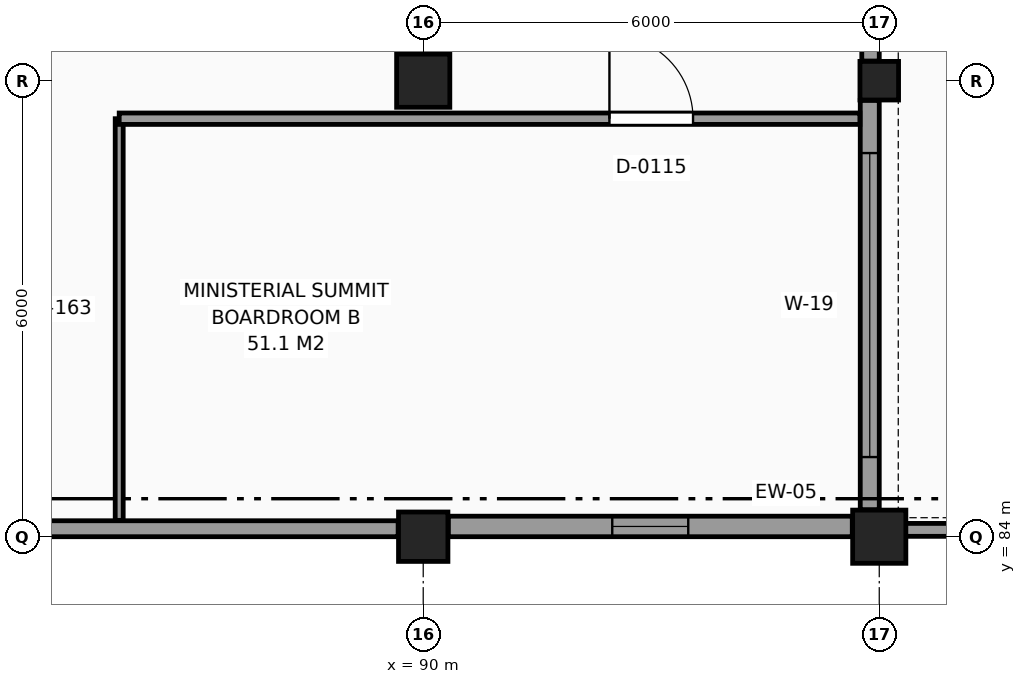
"""IFC4 building model, lengths in metres.
Left out: names, types, materials, properties, quantities, classifications, styles, units other than length and angle.
Written with IfcOpenShell. Run it as: python <this file> out.ifc"""

import sys

from ifc_helpers import new_model, si_unit, direction, frame, frame_2d, origin, origin_2d, place, context, subcontext, project, spatial, rectangle, circle, hollow_circle, extrude, element, fill, save


model = new_model("IFC4")
c1 = context("Model", 3, precision=1e-05, world=origin(), true_north=direction((0.0, 1.0)))
c2 = subcontext(c1, "Body", "Model", "MODEL_VIEW")
j1 = project(units=[si_unit("LENGTHUNIT", "METRE"), si_unit("PLANEANGLEUNIT", "RADIAN")], contexts=[c1])
p1 = place(None, origin())
s1 = spatial("IfcSite", under=j1, at=p1, CompositionType="ELEMENT")
p2 = place(p1, origin())
s2 = spatial("IfcBuilding", under=s1, at=p2, CompositionType="ELEMENT")
p3 = place(p2, frame((0.0, 0.0, 15.0)))
s3 = spatial("IfcBuildingStorey", under=s2, at=p3, CompositionType="ELEMENT", Elevation=15.0)
p4 = place(p3, frame((90.0, 84.0, 0.0), z_axis=(0.0, 0.0, 1.0), x_axis=(1.0, 0.0, 0.0)))
e1 = element("IfcColumn", 1, at=p4, inside=s3, PredefinedType="COLUMN", context=c2, shape_type="SweptSolid", body=[
    extrude(rectangle(XDim=0.65, YDim=0.65, at=origin_2d()), origin(), (0.0, 0.0, 1.0), 4.8),
])
for number, where, z_axis, x_axis in (
    (2, (90.0, 90.0, 0.0), (0.0, 0.0, 1.0), (1.0, 0.0, 0.0)),
    (3, (96.0, 84.0, 0.0), (0.0, 0.0, 1.0), (1.0, 0.0, 0.0)),
):
    element("IfcColumn", number, at=place(p3, frame(where, z_axis=z_axis, x_axis=x_axis)), inside=s3, PredefinedType="COLUMN", context=c2, shape_type="SweptSolid", body=[
        extrude(circle(Radius=0.35, at=origin_2d()), origin(), (0.0, 0.0, 1.0), 4.8),
    ])
p5 = place(p3, frame((96.0, 90.0, 0.0), z_axis=(0.0, 0.0, 1.0), x_axis=(1.0, 0.0, 0.0)))
e4 = element("IfcColumn", 4, at=p5, inside=s3, PredefinedType="COLUMN", context=c2, shape_type="SweptSolid", body=[
    extrude(hollow_circle(Radius=0.254, WallThickness=0.025, at=origin_2d()), origin(), (0.0, 0.0, 1.0), 4.8),
])
p6 = place(p3, frame((84.355, 84.105, 0.0), z_axis=(0.0, 0.0, 1.0), x_axis=(1.0, 0.0, 0.0)))
e5 = element("IfcWall", 5, at=p6, inside=s3, PredefinedType="SOLIDWALL", context=c2, shape_type="SweptSolid", body=[
    extrude(rectangle(XDim=5.315, YDim=0.21, at=frame_2d((2.657, 0.0))), origin(), (0.0, 0.0, 1.0), 3.845),
])
p7 = place(p3, frame((90.33, 84.135, 0.0), z_axis=(0.0, 0.0, 1.0), x_axis=(1.0, 0.0, 0.0)))
e6 = element("IfcWall", 6, at=p7, inside=s3, PredefinedType="SOLIDWALL", context=c2, shape_type="SweptSolid", body=[
    extrude(rectangle(XDim=5.315, YDim=0.27, at=frame_2d((2.657, 0.0))), origin(), (0.0, 0.0, 1.0), 3.845),
])
p8 = place(p7, frame((2.157, 0.0, 0.85)))
e7 = element("IfcOpeningElement", 7, at=p8, cuts=e6, PredefinedType="OPENING", context=c2, shape_type="SweptSolid", body=[
    extrude(rectangle(XDim=1.0, YDim=1.35, at=frame_2d((0.5, 0.675))), frame((0.0, 0.145, 0.0), z_axis=(0.0, -1.0, 0.0), x_axis=(1.0, 0.0, 0.0)), (0.0, 0.0, 1.0), 0.29),
])
p9 = place(p3, frame((95.875, 84.355, 0.0), z_axis=(0.0, 0.0, 1.0), x_axis=(0.0, 1.0, 0.0)))
e8 = element("IfcWall", 8, at=p9, inside=s3, PredefinedType="SOLIDWALL", context=c2, shape_type="SweptSolid", body=[
    extrude(rectangle(XDim=5.386, YDim=0.25, at=frame_2d((2.693, 0.0))), origin(), (0.0, 0.0, 1.0), 3.845),
])
p10 = place(p9, frame((0.693, 0.0, 0.85)))
e9 = element("IfcOpeningElement", 9, at=p10, cuts=e8, PredefinedType="OPENING", context=c2, shape_type="SweptSolid", body=[
    extrude(rectangle(XDim=4.0, YDim=1.3, at=frame_2d((2.0, 0.65))), frame((0.0, 0.135, 0.0), z_axis=(0.0, -1.0, 0.0), x_axis=(1.0, 0.0, 0.0)), (0.0, 0.0, 1.0), 0.27),
])
p11 = place(p3, frame((95.885, 90.259, 0.0), z_axis=(0.0, 0.0, 1.0), x_axis=(0.0, 1.0, 0.0)))
e10 = element("IfcWall", 10, at=p11, inside=s3, PredefinedType="SOLIDWALL", context=c2, shape_type="SweptSolid", body=[
    extrude(rectangle(XDim=5.386, YDim=0.23, at=frame_2d((2.693, 0.0))), origin(), (0.0, 0.0, 1.0), 3.81),
])
p12 = place(p11, frame((0.943, 0.0, 0.85)))
e11 = element("IfcOpeningElement", 11, at=p12, cuts=e10, PredefinedType="OPENING", context=c2, shape_type="SweptSolid", body=[
    extrude(rectangle(XDim=3.5, YDim=1.3, at=frame_2d((1.75, 0.65))), frame((0.0, 0.125, 0.0), z_axis=(0.0, -1.0, 0.0), x_axis=(1.0, 0.0, 0.0)), (0.0, 0.0, 1.0), 0.25),
])
p13 = place(p3, frame((96.3, 84.09, 0.0), z_axis=(0.0, 0.0, 1.0), x_axis=(1.0, 0.0, 0.0)))
e12 = element("IfcWall", 12, at=p13, inside=s3, PredefinedType="PARAPET", context=c2, shape_type="SweptSolid", body=[
    extrude(rectangle(XDim=29.61, YDim=0.17, at=frame_2d((14.805, 0.0))), origin(), (0.0, 0.0, 1.0), 0.65),
])
p14 = place(p3, frame((86.0, 84.215, 0.0), z_axis=(0.0, 0.0, 1.0), x_axis=(0.0, 1.0, 0.0)))
e13 = element("IfcWall", 13, at=p14, inside=s3, PredefinedType="PARTITIONING", context=c2, shape_type="SweptSolid", body=[
    extrude(rectangle(XDim=5.285, YDim=0.105, at=frame_2d((2.643, 0.0))), origin(), (0.0, 0.0, 1.0), 4.45),
])
p15 = place(p3, frame((86.0, 89.5, 0.0), z_axis=(0.0, 0.0, 1.0), x_axis=(1.0, 0.0, 0.0)))
e14 = element("IfcWall", 14, at=p15, inside=s3, PredefinedType="PARTITIONING", context=c2, shape_type="SweptSolid", body=[
    extrude(rectangle(XDim=9.745, YDim=0.15, at=frame_2d((4.873, 0.0))), origin(), (0.0, 0.0, 1.0), 4.45),
])
p16 = place(p15, frame((6.45, 0.0, 0.0)))
e15 = element("IfcOpeningElement", 15, at=p16, cuts=e14, PredefinedType="OPENING", context=c2, shape_type="SweptSolid", body=[
    extrude(rectangle(XDim=1.1, YDim=2.15, at=frame_2d((0.55, 1.075))), frame((0.0, 0.085, 0.0), z_axis=(0.0, -1.0, 0.0), x_axis=(1.0, 0.0, 0.0)), (0.0, 0.0, 1.0), 0.17),
])
p17 = place(p10, origin())
e16 = element("IfcWindow", 16, at=p17, inside=s3, PartitioningType="SINGLE_PANEL", PredefinedType="WINDOW", context=c2, shape_type="SweptSolid", body=[
    extrude(rectangle(XDim=4.0, YDim=1.3, at=frame_2d((2.0, 0.65))), frame((0.0, 0.03, 0.0), z_axis=(0.0, -1.0, 0.0), x_axis=(1.0, 0.0, 0.0)), (0.0, 0.0, 1.0), 0.06),
])
fill(e9, e16)
p18 = place(p8, origin())
e17 = element("IfcWindow", 17, at=p18, inside=s3, PartitioningType="SINGLE_PANEL", PredefinedType="WINDOW", context=c2, shape_type="SweptSolid", body=[
    extrude(rectangle(XDim=1.0, YDim=1.35, at=frame_2d((0.5, 0.675))), frame((0.0, 0.03, 0.0), z_axis=(0.0, -1.0, 0.0), x_axis=(1.0, 0.0, 0.0)), (0.0, 0.0, 1.0), 0.06),
])
fill(e7, e17)
p19 = place(p16, origin())
e18 = element("IfcDoor", 18, at=p19, inside=s3, OperationType="SINGLE_SWING_LEFT", PredefinedType="DOOR", context=c2, shape_type="SweptSolid", body=[
    extrude(rectangle(XDim=1.1, YDim=2.15, at=frame_2d((0.55, 1.075))), frame((0.0, 0.025, 0.0), z_axis=(0.0, -1.0, 0.0), x_axis=(1.0, 0.0, 0.0)), (0.0, 0.0, 1.0), 0.05),
])
fill(e15, e18)
save(model, sys.argv[1])
